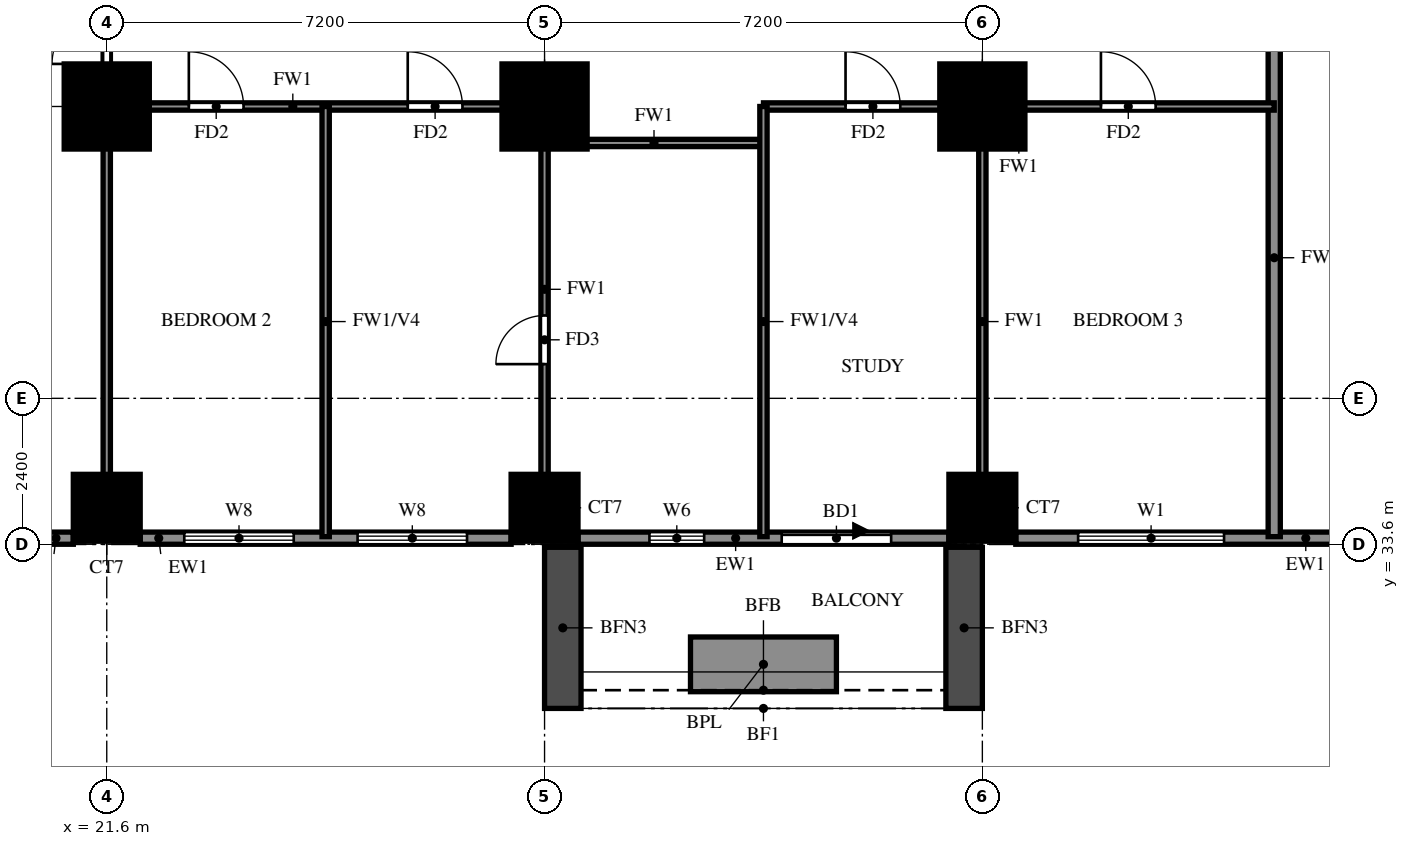
"""IFC4 building model, lengths in metres.
Left out: names, types, materials, properties, quantities, classifications, styles, units other than length and angle.
Written with IfcOpenShell. Run it as: python <this file> out.ifc"""

import sys

from ifc_helpers import new_model, si_unit, direction, frame, frame_2d, origin, origin_2d, place, context, subcontext, project, spatial, rectangle, extrude, source, transform, mapped, element, fill, save


model = new_model("IFC4")
c1 = context("Model", 3, precision=1e-05, world=origin(), true_north=direction((0.0, 1.0)))
c2 = subcontext(c1, "Body", "Model", "MODEL_VIEW")
j1 = project(units=[si_unit("LENGTHUNIT", "METRE"), si_unit("PLANEANGLEUNIT", "RADIAN")], contexts=[c1])
p1 = place(None, origin())
s1 = spatial("IfcSite", under=j1, at=p1, CompositionType="ELEMENT")
p2 = place(p1, origin())
s2 = spatial("IfcBuilding", under=s1, at=p2, CompositionType="ELEMENT")
p3 = place(p2, frame((0.0, 0.0, 34.0)))
s3 = spatial("IfcBuildingStorey", under=s2, at=p3, CompositionType="ELEMENT", Elevation=34.0)
m1 = source(origin(), c2, "Body", "SweptSolid", [
    extrude(rectangle(XDim=1.1, YDim=1.1, at=origin_2d()), origin(), (0.0, 0.0, 1.0), 3.18),
])
for number, where, z_axis, x_axis in (
    (1, (21.6, 34.2, 0.0), (0.0, 0.0, 1.0), (1.0, 0.0, 0.0)),
    (2, (28.8, 34.2, 0.0), (0.0, 0.0, 1.0), (1.0, 0.0, 0.0)),
    (3, (36.0, 34.2, 0.0), (0.0, 0.0, 1.0), (1.0, 0.0, 0.0)),
):
    element("IfcColumn", number, at=place(p3, frame(where, z_axis=z_axis, x_axis=x_axis)), inside=s3, PredefinedType="COLUMN", context=c2, shape_type="MappedRepresentation", body=[
        mapped(m1, transform((0.0, 0.0, 0.0))),
    ])
m2 = source(origin(), c2, "Body", "SweptSolid", [
    extrude(rectangle(XDim=1.4, YDim=1.4, at=origin_2d()), origin(), (0.0, 0.0, 1.0), 3.18),
])
for number, where, z_axis, x_axis in (
    (4, (21.6, 40.8, 0.0), (0.0, 0.0, 1.0), (1.0, 0.0, 0.0)),
    (5, (28.8, 40.8, 0.0), (0.0, 0.0, 1.0), (1.0, 0.0, 0.0)),
    (6, (36.0, 40.8, 0.0), (0.0, 0.0, 1.0), (1.0, 0.0, 0.0)),
):
    element("IfcColumn", number, at=place(p3, frame(where, z_axis=z_axis, x_axis=x_axis)), inside=s3, PredefinedType="COLUMN", context=c2, shape_type="MappedRepresentation", body=[
        mapped(m2, transform((0.0, 0.0, 0.0))),
    ])
p4 = place(p3, frame((18.2, 33.7, 0.0), z_axis=(0.0, 0.0, 1.0), x_axis=(1.0, 0.0, 0.0)))
e7 = element("IfcWall", 7, at=p4, inside=s3, PredefinedType="SOLIDWALL", context=c2, shape_type="SweptSolid", body=[
    extrude(rectangle(XDim=2.85, YDim=0.2, at=frame_2d((1.425, 0.0))), origin(), (0.0, 0.0, 1.0), 3.18),
])
p5 = place(p4, frame((0.525, 0.0, 0.6)))
e8 = element("IfcOpeningElement", 8, at=p5, cuts=e7, PredefinedType="OPENING", context=c2, shape_type="SweptSolid", body=[
    extrude(rectangle(XDim=1.8, YDim=2.4, at=frame_2d((0.9, 1.2))), frame((0.0, 0.11, 0.0), z_axis=(0.0, -1.0, 0.0), x_axis=(1.0, 0.0, 0.0)), (0.0, 0.0, 1.0), 0.22),
])
p6 = place(p3, frame((22.15, 33.7, 0.0), z_axis=(0.0, 0.0, 1.0), x_axis=(1.0, 0.0, 0.0)))
e9 = element("IfcWall", 9, at=p6, inside=s3, PredefinedType="SOLIDWALL", context=c2, shape_type="SweptSolid", body=[
    extrude(rectangle(XDim=6.1, YDim=0.2, at=frame_2d((3.05, 0.0))), origin(), (0.0, 0.0, 1.0), 3.18),
])
p7 = place(p6, frame((0.725, 0.0, 0.6)))
e10 = element("IfcOpeningElement", 10, at=p7, cuts=e9, PredefinedType="OPENING", context=c2, shape_type="SweptSolid", body=[
    extrude(rectangle(XDim=1.8, YDim=2.4, at=frame_2d((0.9, 1.2))), frame((0.0, 0.11, 0.0), z_axis=(0.0, -1.0, 0.0), x_axis=(1.0, 0.0, 0.0)), (0.0, 0.0, 1.0), 0.22),
])
p8 = place(p6, frame((3.575, 0.0, 0.6)))
e11 = element("IfcOpeningElement", 11, at=p8, cuts=e9, PredefinedType="OPENING", context=c2, shape_type="SweptSolid", body=[
    extrude(rectangle(XDim=1.8, YDim=2.4, at=frame_2d((0.9, 1.2))), frame((0.0, 0.11, 0.0), z_axis=(0.0, -1.0, 0.0), x_axis=(1.0, 0.0, 0.0)), (0.0, 0.0, 1.0), 0.22),
])
p9 = place(p3, frame((29.35, 33.7, 0.0), z_axis=(0.0, 0.0, 1.0), x_axis=(1.0, 0.0, 0.0)))
e12 = element("IfcWall", 12, at=p9, inside=s3, PredefinedType="SOLIDWALL", context=c2, shape_type="SweptSolid", body=[
    extrude(rectangle(XDim=6.1, YDim=0.2, at=frame_2d((3.05, 0.0))), origin(), (0.0, 0.0, 1.0), 3.18),
])
p10 = place(p9, frame((3.35, 0.0, 0.0)))
e13 = element("IfcOpeningElement", 13, at=p10, cuts=e12, PredefinedType="OPENING", context=c2, shape_type="SweptSolid", body=[
    extrude(rectangle(XDim=1.8, YDim=2.4, at=frame_2d((0.9, 1.2))), frame((0.0, 0.11, 0.0), z_axis=(0.0, -1.0, 0.0), x_axis=(1.0, 0.0, 0.0)), (0.0, 0.0, 1.0), 0.22),
])
p11 = place(p9, frame((1.175, 0.0, 1.5)))
e14 = element("IfcOpeningElement", 14, at=p11, cuts=e12, PredefinedType="OPENING", context=c2, shape_type="SweptSolid", body=[
    extrude(rectangle(XDim=0.9, YDim=0.9, at=frame_2d((0.45, 0.45))), frame((0.0, 0.11, 0.0), z_axis=(0.0, -1.0, 0.0), x_axis=(1.0, 0.0, 0.0)), (0.0, 0.0, 1.0), 0.22),
])
p12 = place(p3, frame((36.55, 33.7, 0.0), z_axis=(0.0, 0.0, 1.0), x_axis=(1.0, 0.0, 0.0)))
e15 = element("IfcWall", 15, at=p12, inside=s3, PredefinedType="SOLIDWALL", context=c2, shape_type="SweptSolid", body=[
    extrude(rectangle(XDim=5.45, YDim=0.2, at=frame_2d((2.725, 0.0))), origin(), (0.0, 0.0, 1.0), 3.18),
])
p13 = place(p12, frame((1.025, 0.0, 0.6)))
e16 = element("IfcOpeningElement", 16, at=p13, cuts=e15, PredefinedType="OPENING", context=c2, shape_type="SweptSolid", body=[
    extrude(rectangle(XDim=2.4, YDim=2.4, at=frame_2d((1.2, 1.2))), frame((0.0, 0.11, 0.0), z_axis=(0.0, -1.0, 0.0), x_axis=(1.0, 0.0, 0.0)), (0.0, 0.0, 1.0), 0.22),
])
for number, where, z_axis, x_axis in (
    (17, (29.1, 33.55, 0.0), (0.0, 0.0, 1.0), (0.0, -1.0, 0.0)),
    (18, (35.7, 33.55, 0.0), (0.0, 0.0, 1.0), (0.0, -1.0, 0.0)),
):
    element("IfcWall", number, at=place(p3, frame(where, z_axis=z_axis, x_axis=x_axis)), inside=s3, PredefinedType="SOLIDWALL", context=c2, shape_type="SweptSolid", body=[
        extrude(rectangle(XDim=2.65, YDim=0.6, at=frame_2d((1.325, 0.0))), origin(), (0.0, 0.0, 1.0), 2.85),
    ])
p14 = place(p3, frame((31.2, 31.625, 0.0), z_axis=(0.0, 0.0, 1.0), x_axis=(1.0, 0.0, 0.0)))
e19 = element("IfcWall", 19, at=p14, inside=s3, PredefinedType="SOLIDWALL", context=c2, shape_type="SweptSolid", body=[
    extrude(rectangle(XDim=2.4, YDim=0.9, at=frame_2d((1.2, 0.0))), origin(), (0.0, 0.0, 1.0), 0.9),
])
p15 = place(p3, frame((40.8, 33.725, 0.0), z_axis=(0.0, 0.0, 1.0), x_axis=(0.0, 1.0, 0.0)))
e20 = element("IfcWall", 20, at=p15, inside=s3, PredefinedType="SOLIDWALL", context=c2, shape_type="SweptSolid", body=[
    extrude(rectangle(XDim=9.175, YDim=0.2, at=frame_2d((4.587, 0.0))), origin(), (0.0, 0.0, 1.0), 2.28),
])
p16 = place(p3, frame((28.8, 40.2, 0.0), z_axis=(0.0, 0.0, 1.0), x_axis=(1.0, 0.0, 0.0)))
e21 = element("IfcWall", 21, at=p16, inside=s3, PredefinedType="PARTITIONING", context=c2, shape_type="SweptSolid", body=[
    extrude(rectangle(XDim=3.6, YDim=0.12, at=frame_2d((1.8, 0.0))), origin(), (0.0, 0.0, 1.0), 3.18),
])
p17 = place(p3, frame((21.6, 40.8, 0.0), z_axis=(0.0, 0.0, 1.0), x_axis=(1.0, 0.0, 0.0)))
e22 = element("IfcWall", 22, at=p17, inside=s3, PredefinedType="PARTITIONING", context=c2, shape_type="SweptSolid", body=[
    extrude(rectangle(XDim=7.2, YDim=0.12, at=frame_2d((3.6, 0.0))), origin(), (0.0, 0.0, 1.0), 3.18),
])
p18 = place(p17, frame((1.35, 0.0, 0.0)))
e23 = element("IfcOpeningElement", 23, at=p18, cuts=e22, PredefinedType="OPENING", context=c2, shape_type="SweptSolid", body=[
    extrude(rectangle(XDim=0.9, YDim=2.1, at=frame_2d((0.45, 1.05))), frame((0.0, 0.07, 0.0), z_axis=(0.0, -1.0, 0.0), x_axis=(1.0, 0.0, 0.0)), (0.0, 0.0, 1.0), 0.14),
])
p19 = place(p17, frame((4.95, 0.0, 0.0)))
e24 = element("IfcOpeningElement", 24, at=p19, cuts=e22, PredefinedType="OPENING", context=c2, shape_type="SweptSolid", body=[
    extrude(rectangle(XDim=0.9, YDim=2.1, at=frame_2d((0.45, 1.05))), frame((0.0, 0.07, 0.0), z_axis=(0.0, -1.0, 0.0), x_axis=(1.0, 0.0, 0.0)), (0.0, 0.0, 1.0), 0.14),
])
p20 = place(p3, frame((32.4, 40.8, 0.0), z_axis=(0.0, 0.0, 1.0), x_axis=(1.0, 0.0, 0.0)))
e25 = element("IfcWall", 25, at=p20, inside=s3, PredefinedType="PARTITIONING", context=c2, shape_type="SweptSolid", body=[
    extrude(rectangle(XDim=8.4, YDim=0.12, at=frame_2d((4.2, 0.0))), origin(), (0.0, 0.0, 1.0), 3.18),
])
p21 = place(p20, frame((1.35, 0.0, 0.0)))
e26 = element("IfcOpeningElement", 26, at=p21, cuts=e25, PredefinedType="OPENING", context=c2, shape_type="SweptSolid", body=[
    extrude(rectangle(XDim=0.9, YDim=2.1, at=frame_2d((0.45, 1.05))), frame((0.0, 0.07, 0.0), z_axis=(0.0, -1.0, 0.0), x_axis=(1.0, 0.0, 0.0)), (0.0, 0.0, 1.0), 0.14),
])
p22 = place(p20, frame((5.55, 0.0, 0.0)))
e27 = element("IfcOpeningElement", 27, at=p22, cuts=e25, PredefinedType="OPENING", context=c2, shape_type="SweptSolid", body=[
    extrude(rectangle(XDim=0.9, YDim=2.1, at=frame_2d((0.45, 1.05))), frame((0.0, 0.07, 0.0), z_axis=(0.0, -1.0, 0.0), x_axis=(1.0, 0.0, 0.0)), (0.0, 0.0, 1.0), 0.14),
])
p23 = place(p3, frame((21.6, 33.725, 0.0), z_axis=(0.0, 0.0, 1.0), x_axis=(0.0, 1.0, 0.0)))
e28 = element("IfcWall", 28, at=p23, inside=s3, PredefinedType="PARTITIONING", context=c2, shape_type="SweptSolid", body=[
    extrude(rectangle(XDim=35.875, YDim=0.12, at=frame_2d((17.938, 0.0))), origin(), (0.0, 0.0, 1.0), 3.18),
])
p24 = place(p23, frame((7.775, 0.0, 0.0)))
e29 = element("IfcOpeningElement", 29, at=p24, cuts=e28, PredefinedType="OPENING", context=c2, shape_type="SweptSolid", body=[
    extrude(rectangle(XDim=0.9, YDim=2.1, at=frame_2d((0.45, 1.05))), frame((0.0, 0.07, 0.0), z_axis=(0.0, -1.0, 0.0), x_axis=(1.0, 0.0, 0.0)), (0.0, 0.0, 1.0), 0.14),
])
p25 = place(p23, frame((15.625, 0.0, 0.0)))
e30 = element("IfcOpeningElement", 30, at=p25, cuts=e28, PredefinedType="OPENING", context=c2, shape_type="SweptSolid", body=[
    extrude(rectangle(XDim=0.9, YDim=2.1, at=frame_2d((0.45, 1.05))), frame((0.0, 0.07, 0.0), z_axis=(0.0, -1.0, 0.0), x_axis=(1.0, 0.0, 0.0)), (0.0, 0.0, 1.0), 0.14),
])
p26 = place(p23, frame((22.225, 0.0, 0.0)))
e31 = element("IfcOpeningElement", 31, at=p26, cuts=e28, PredefinedType="OPENING", context=c2, shape_type="SweptSolid", body=[
    extrude(rectangle(XDim=1.5, YDim=2.1, at=frame_2d((0.75, 1.05))), frame((0.0, 0.07, 0.0), z_axis=(0.0, -1.0, 0.0), x_axis=(1.0, 0.0, 0.0)), (0.0, 0.0, 1.0), 0.14),
])
p27 = place(p23, frame((26.425, 0.0, 0.0)))
e32 = element("IfcOpeningElement", 32, at=p27, cuts=e28, PredefinedType="OPENING", context=c2, shape_type="SweptSolid", body=[
    extrude(rectangle(XDim=0.9, YDim=2.1, at=frame_2d((0.45, 1.05))), frame((0.0, 0.07, 0.0), z_axis=(0.0, -1.0, 0.0), x_axis=(1.0, 0.0, 0.0)), (0.0, 0.0, 1.0), 0.14),
])
p28 = place(p23, frame((30.025, 0.0, 0.0)))
e33 = element("IfcOpeningElement", 33, at=p28, cuts=e28, PredefinedType="OPENING", context=c2, shape_type="SweptSolid", body=[
    extrude(rectangle(XDim=0.9, YDim=2.1, at=frame_2d((0.45, 1.05))), frame((0.0, 0.07, 0.0), z_axis=(0.0, -1.0, 0.0), x_axis=(1.0, 0.0, 0.0)), (0.0, 0.0, 1.0), 0.14),
])
p29 = place(p23, frame((33.625, 0.0, 0.0)))
e34 = element("IfcOpeningElement", 34, at=p29, cuts=e28, PredefinedType="OPENING", context=c2, shape_type="SweptSolid", body=[
    extrude(rectangle(XDim=0.9, YDim=2.1, at=frame_2d((0.45, 1.05))), frame((0.0, 0.07, 0.0), z_axis=(0.0, -1.0, 0.0), x_axis=(1.0, 0.0, 0.0)), (0.0, 0.0, 1.0), 0.14),
])
p30 = place(p3, frame((25.2, 33.725, 0.0), z_axis=(0.0, 0.0, 1.0), x_axis=(0.0, 1.0, 0.0)))
e35 = element("IfcWall", 35, at=p30, inside=s3, PredefinedType="PARTITIONING", context=c2, shape_type="SweptSolid", body=[
    extrude(rectangle(XDim=7.075, YDim=0.12, at=frame_2d((3.538, 0.0))), origin(), (0.0, 0.0, 1.0), 2.28),
])
p31 = place(p3, frame((28.8, 33.725, 0.0), z_axis=(0.0, 0.0, 1.0), x_axis=(0.0, 1.0, 0.0)))
e36 = element("IfcWall", 36, at=p31, inside=s3, PredefinedType="PARTITIONING", context=c2, shape_type="SweptSolid", body=[
    extrude(rectangle(XDim=7.075, YDim=0.12, at=frame_2d((3.538, 0.0))), origin(), (0.0, 0.0, 1.0), 3.18),
])
p32 = place(p31, frame((2.837, 0.0, 0.0)))
e37 = element("IfcOpeningElement", 37, at=p32, cuts=e36, PredefinedType="OPENING", context=c2, shape_type="SweptSolid", body=[
    extrude(rectangle(XDim=0.8, YDim=2.1, at=frame_2d((0.4, 1.05))), frame((0.0, 0.07, 0.0), z_axis=(0.0, -1.0, 0.0), x_axis=(1.0, 0.0, 0.0)), (0.0, 0.0, 1.0), 0.14),
])
p33 = place(p3, frame((32.4, 33.725, 0.0), z_axis=(0.0, 0.0, 1.0), x_axis=(0.0, 1.0, 0.0)))
e38 = element("IfcWall", 38, at=p33, inside=s3, PredefinedType="PARTITIONING", context=c2, shape_type="SweptSolid", body=[
    extrude(rectangle(XDim=7.075, YDim=0.12, at=frame_2d((3.538, 0.0))), origin(), (0.0, 0.0, 1.0), 2.28),
])
p34 = place(p3, frame((36.0, 33.725, 0.0), z_axis=(0.0, 0.0, 1.0), x_axis=(0.0, 1.0, 0.0)))
e39 = element("IfcWall", 39, at=p34, inside=s3, PredefinedType="PARTITIONING", context=c2, shape_type="SweptSolid", body=[
    extrude(rectangle(XDim=7.075, YDim=0.12, at=frame_2d((3.538, 0.0))), origin(), (0.0, 0.0, 1.0), 3.18),
])
p35 = place(p7, origin())
e40 = element("IfcWindow", 40, at=p35, inside=s3, PartitioningType="DOUBLE_PANEL_VERTICAL", PredefinedType="WINDOW", context=c2, shape_type="SweptSolid", body=[
    extrude(rectangle(XDim=1.8, YDim=2.4, at=frame_2d((0.9, 1.2))), frame((0.0, 0.03, 0.0), z_axis=(0.0, -1.0, 0.0), x_axis=(1.0, 0.0, 0.0)), (0.0, 0.0, 1.0), 0.06),
])
fill(e10, e40)
p36 = place(p8, origin())
e41 = element("IfcWindow", 41, at=p36, inside=s3, PartitioningType="DOUBLE_PANEL_VERTICAL", PredefinedType="WINDOW", context=c2, shape_type="SweptSolid", body=[
    extrude(rectangle(XDim=1.8, YDim=2.4, at=frame_2d((0.9, 1.2))), frame((0.0, 0.03, 0.0), z_axis=(0.0, -1.0, 0.0), x_axis=(1.0, 0.0, 0.0)), (0.0, 0.0, 1.0), 0.06),
])
fill(e11, e41)
p37 = place(p10, origin())
e42 = element("IfcDoor", 42, at=p37, inside=s3, OperationType="DOUBLE_DOOR_SLIDING", PredefinedType="DOOR", context=c2, shape_type="SweptSolid", body=[
    extrude(rectangle(XDim=1.8, YDim=2.4, at=frame_2d((0.9, 1.2))), frame((0.0, 0.025, 0.0), z_axis=(0.0, -1.0, 0.0), x_axis=(1.0, 0.0, 0.0)), (0.0, 0.0, 1.0), 0.05),
])
fill(e13, e42)
p38 = place(p11, origin())
e43 = element("IfcWindow", 43, at=p38, inside=s3, PartitioningType="SINGLE_PANEL", PredefinedType="WINDOW", context=c2, shape_type="SweptSolid", body=[
    extrude(rectangle(XDim=0.9, YDim=0.9, at=frame_2d((0.45, 0.45))), frame((0.0, 0.03, 0.0), z_axis=(0.0, -1.0, 0.0), x_axis=(1.0, 0.0, 0.0)), (0.0, 0.0, 1.0), 0.06),
])
fill(e14, e43)
p39 = place(p13, origin())
e44 = element("IfcWindow", 44, at=p39, inside=s3, PartitioningType="DOUBLE_PANEL_VERTICAL", PredefinedType="WINDOW", context=c2, shape_type="SweptSolid", body=[
    extrude(rectangle(XDim=2.4, YDim=2.4, at=frame_2d((1.2, 1.2))), frame((0.0, 0.03, 0.0), z_axis=(0.0, -1.0, 0.0), x_axis=(1.0, 0.0, 0.0)), (0.0, 0.0, 1.0), 0.06),
])
fill(e16, e44)
p40 = place(p24, origin())
e45 = element("IfcDoor", 45, at=p40, inside=s3, OperationType="SINGLE_SWING_RIGHT", PredefinedType="DOOR", context=c2, shape_type="SweptSolid", body=[
    extrude(rectangle(XDim=0.9, YDim=2.1, at=frame_2d((0.45, 1.05))), frame((0.0, 0.025, 0.0), z_axis=(0.0, -1.0, 0.0), x_axis=(1.0, 0.0, 0.0)), (0.0, 0.0, 1.0), 0.05),
])
fill(e29, e45)
p41 = place(p18, origin())
e46 = element("IfcDoor", 46, at=p41, inside=s3, OperationType="SINGLE_SWING_RIGHT", PredefinedType="DOOR", context=c2, shape_type="SweptSolid", body=[
    extrude(rectangle(XDim=0.9, YDim=2.1, at=frame_2d((0.45, 1.05))), frame((0.0, 0.025, 0.0), z_axis=(0.0, -1.0, 0.0), x_axis=(1.0, 0.0, 0.0)), (0.0, 0.0, 1.0), 0.05),
])
fill(e23, e46)
p42 = place(p19, origin())
e47 = element("IfcDoor", 47, at=p42, inside=s3, OperationType="SINGLE_SWING_LEFT", PredefinedType="DOOR", context=c2, shape_type="SweptSolid", body=[
    extrude(rectangle(XDim=0.9, YDim=2.1, at=frame_2d((0.45, 1.05))), frame((0.0, 0.025, 0.0), z_axis=(0.0, -1.0, 0.0), x_axis=(1.0, 0.0, 0.0)), (0.0, 0.0, 1.0), 0.05),
])
fill(e24, e47)
p43 = place(p32, origin())
e48 = element("IfcDoor", 48, at=p43, inside=s3, OperationType="SINGLE_SWING_LEFT", PredefinedType="DOOR", context=c2, shape_type="SweptSolid", body=[
    extrude(rectangle(XDim=0.8, YDim=2.1, at=frame_2d((0.4, 1.05))), frame((0.0, 0.025, 0.0), z_axis=(0.0, -1.0, 0.0), x_axis=(1.0, 0.0, 0.0)), (0.0, 0.0, 1.0), 0.05),
])
fill(e37, e48)
p44 = place(p21, origin())
e49 = element("IfcDoor", 49, at=p44, inside=s3, OperationType="SINGLE_SWING_RIGHT", PredefinedType="DOOR", context=c2, shape_type="SweptSolid", body=[
    extrude(rectangle(XDim=0.9, YDim=2.1, at=frame_2d((0.45, 1.05))), frame((0.0, 0.025, 0.0), z_axis=(0.0, -1.0, 0.0), x_axis=(1.0, 0.0, 0.0)), (0.0, 0.0, 1.0), 0.05),
])
fill(e26, e49)
p45 = place(p22, origin())
e50 = element("IfcDoor", 50, at=p45, inside=s3, OperationType="SINGLE_SWING_LEFT", PredefinedType="DOOR", context=c2, shape_type="SweptSolid", body=[
    extrude(rectangle(XDim=0.9, YDim=2.1, at=frame_2d((0.45, 1.05))), frame((0.0, 0.025, 0.0), z_axis=(0.0, -1.0, 0.0), x_axis=(1.0, 0.0, 0.0)), (0.0, 0.0, 1.0), 0.05),
])
fill(e27, e50)
save(model, sys.argv[1])
